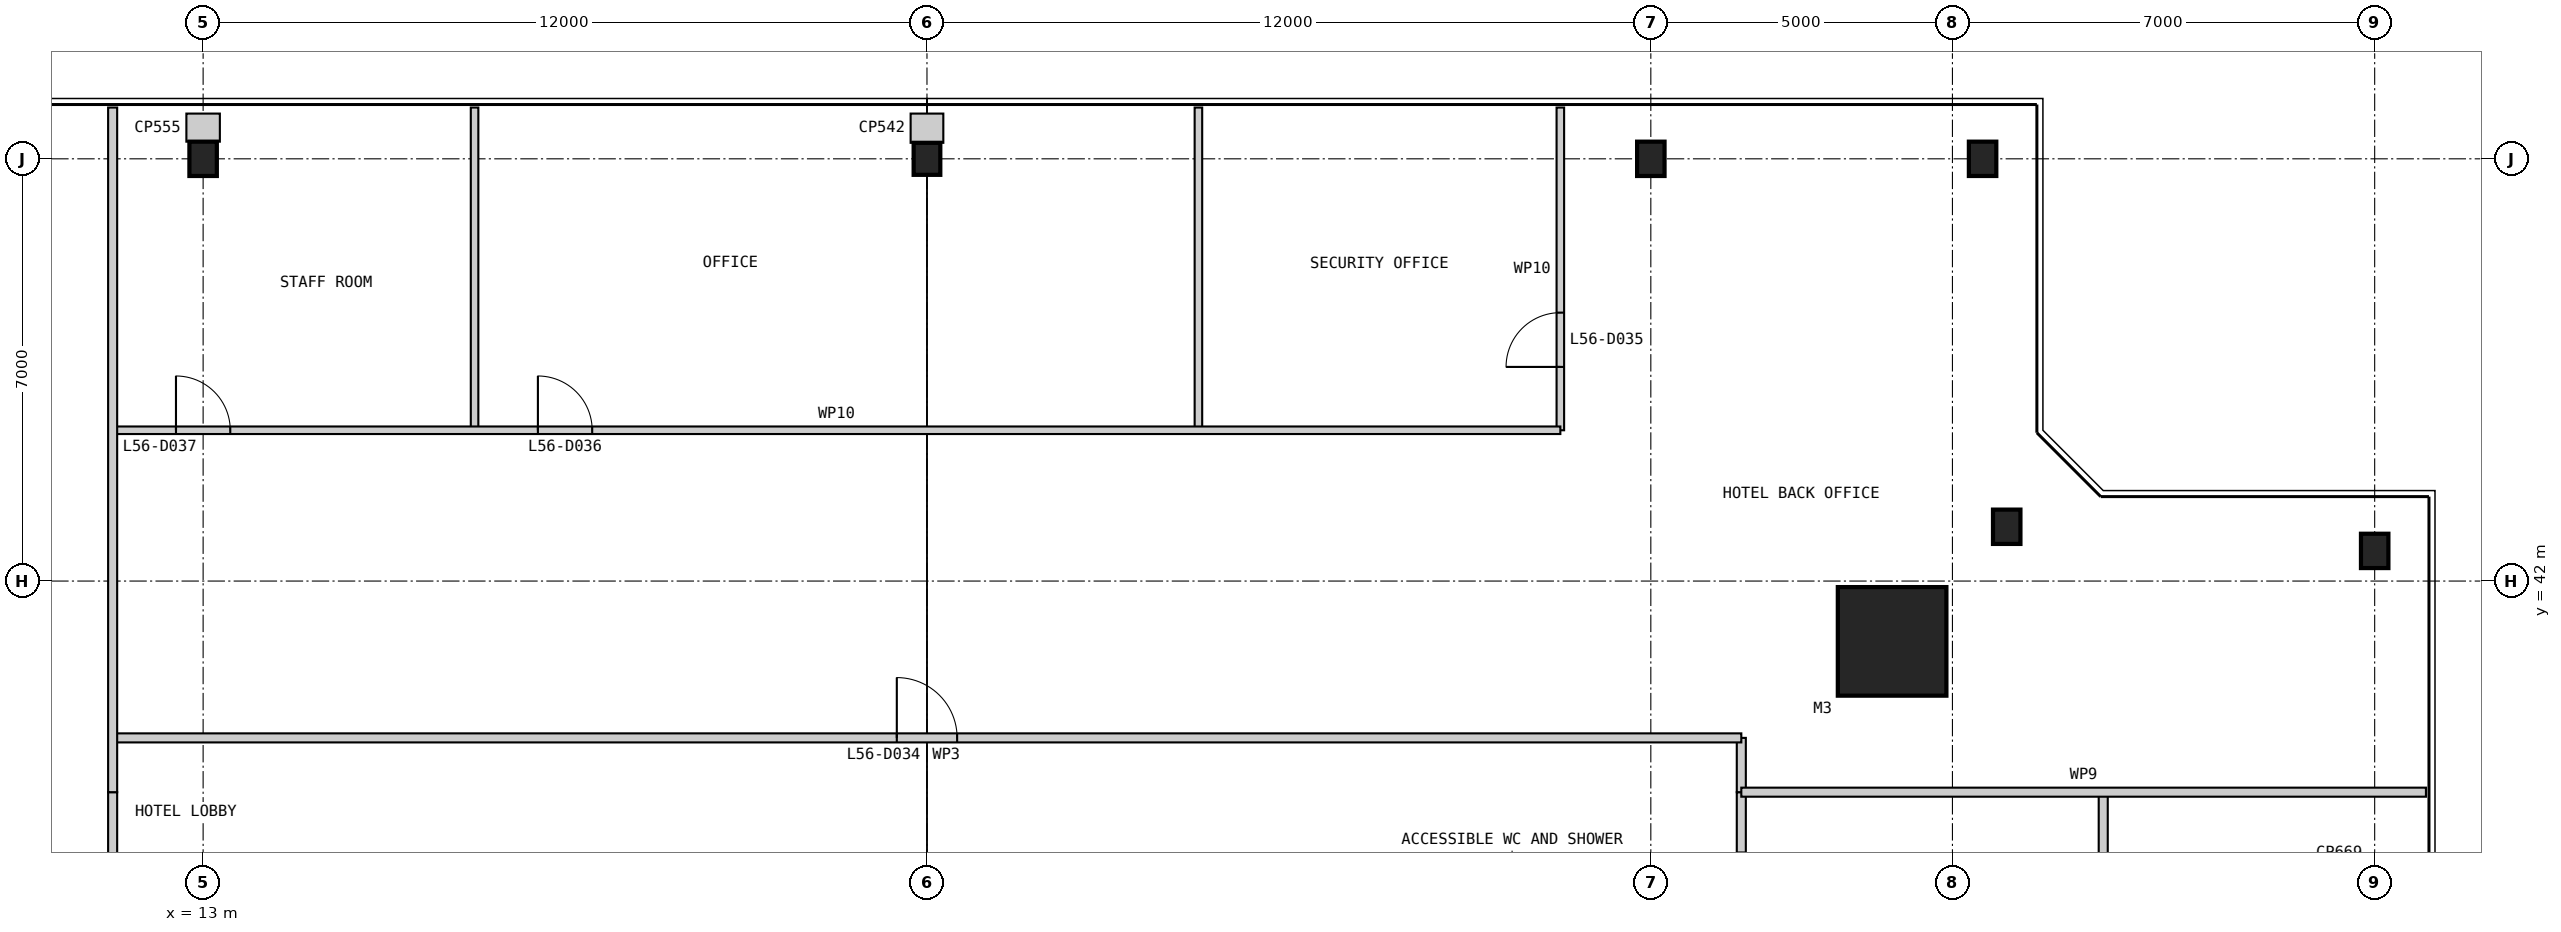
"""IFC4 building model, lengths in metres.
Left out: names, types, materials, properties, quantities, classifications, styles, units other than length and angle.
Written with IfcOpenShell. Run it as: python <this file> out.ifc"""

import sys

from ifc_helpers import new_model, si_unit, direction, frame, frame_2d, origin, origin_2d, place, context, subcontext, project, spatial, rectangle, i_section, extrude, element, fill, save


model = new_model("IFC4")
c1 = context("Model", 3, precision=1e-05, world=origin(), true_north=direction((0.0, 1.0)))
c2 = subcontext(c1, "Body", "Model", "MODEL_VIEW")
j1 = project(units=[si_unit("LENGTHUNIT", "METRE"), si_unit("PLANEANGLEUNIT", "RADIAN")], contexts=[c1])
p1 = place(None, origin())
s1 = spatial("IfcSite", under=j1, at=p1, CompositionType="ELEMENT")
p2 = place(p1, origin())
s2 = spatial("IfcBuilding", under=s1, at=p2, CompositionType="ELEMENT")
p3 = place(p2, frame((0.0, 0.0, 239.8)))
s3 = spatial("IfcBuildingStorey", under=s2, at=p3, CompositionType="ELEMENT", Elevation=239.8)
p4 = place(p3, frame((41.0, 41.0, 0.0), z_axis=(0.0, 0.0, 1.0), x_axis=(1.0, 0.0, 0.0)))
e1 = element("IfcColumn", 1, at=p4, inside=s3, PredefinedType="COLUMN", context=c2, shape_type="SweptSolid", body=[
    extrude(rectangle(XDim=1.8, YDim=1.8, at=origin_2d()), origin(), (0.0, 0.0, 1.0), 6.0),
])
for number, where, z_axis, x_axis in (
    (2, (49.0, 42.5, 0.0), (0.0, 0.0, 1.0), (1.0, 0.0, 0.0)),
    (3, (42.9, 42.9, 0.0), (0.0, 0.0, 1.0), (1.0, 0.0, 0.0)),
    (4, (42.5, 49.0, 0.0), (0.0, 0.0, 1.0), (1.0, 0.0, 0.0)),
    (5, (37.0, 49.0, 0.0), (0.0, 0.0, 1.0), (1.0, 0.0, 0.0)),
):
    element("IfcColumn", number, at=place(p3, frame(where, z_axis=z_axis, x_axis=x_axis)), inside=s3, PredefinedType="COLUMN", context=c2, shape_type="SweptSolid", body=[
        extrude(i_section(OverallWidth=0.455, OverallDepth=0.569, WebThickness=0.078, FlangeThickness=0.125, at=origin_2d()), origin(), (0.0, 0.0, 1.0), 6.0),
    ])
p5 = place(p3, frame((25.0, 49.0, 0.0), z_axis=(0.0, 0.0, 1.0), x_axis=(1.0, 0.0, 0.0)))
e6 = element("IfcColumn", 6, at=p5, inside=s3, PredefinedType="COLUMN", context=c2, shape_type="SweptSolid", body=[
    extrude(i_section(OverallWidth=0.442, OverallDepth=0.531, WebThickness=0.066, FlangeThickness=0.106, at=origin_2d()), origin(), (0.0, 0.0, 1.0), 6.0),
])
p6 = place(p3, frame((13.0, 49.0, 0.0), z_axis=(0.0, 0.0, 1.0), x_axis=(1.0, 0.0, 0.0)))
e7 = element("IfcColumn", 7, at=p6, inside=s3, PredefinedType="COLUMN", context=c2, shape_type="SweptSolid", body=[
    extrude(i_section(OverallWidth=0.455, OverallDepth=0.569, WebThickness=0.078, FlangeThickness=0.125, at=origin_2d()), origin(), (0.0, 0.0, 1.0), 6.0),
])
p7 = place(p3, frame((38.5, 11.5, 0.0), z_axis=(0.0, 0.0, 1.0), x_axis=(0.0, 1.0, 0.0)))
e8 = element("IfcWall", 8, at=p7, inside=s3, PredefinedType="PARTITIONING", context=c2, shape_type="SweptSolid", body=[
    extrude(rectangle(XDim=27.0, YDim=0.15, at=frame_2d((13.5, 0.0))), origin(), (0.0, 0.0, 1.0), 5.85),
])
p8 = place(p7, frame((7.0, 0.0, 0.0)))
e9 = element("IfcOpeningElement", 9, at=p8, cuts=e8, PredefinedType="OPENING", context=c2, shape_type="SweptSolid", body=[
    extrude(rectangle(XDim=1.0, YDim=2.2, at=frame_2d((0.5, 1.1))), frame((0.0, 0.085, 0.0), z_axis=(0.0, -1.0, 0.0), x_axis=(1.0, 0.0, 0.0)), (0.0, 0.0, 1.0), 0.17),
])
p9 = place(p7, frame((16.0, 0.0, 0.0)))
e10 = element("IfcOpeningElement", 10, at=p9, cuts=e8, PredefinedType="OPENING", context=c2, shape_type="SweptSolid", body=[
    extrude(rectangle(XDim=1.0, YDim=2.2, at=frame_2d((0.5, 1.1))), frame((0.0, 0.085, 0.0), z_axis=(0.0, -1.0, 0.0), x_axis=(1.0, 0.0, 0.0)), (0.0, 0.0, 1.0), 0.17),
])
p10 = place(p7, frame((19.0, 0.0, 0.0)))
e11 = element("IfcOpeningElement", 11, at=p10, cuts=e8, PredefinedType="OPENING", context=c2, shape_type="SweptSolid", body=[
    extrude(rectangle(XDim=1.0, YDim=2.2, at=frame_2d((0.5, 1.1))), frame((0.0, 0.085, 0.0), z_axis=(0.0, -1.0, 0.0), x_axis=(1.0, 0.0, 0.0)), (0.0, 0.0, 1.0), 0.17),
])
p11 = place(p7, frame((22.0, 0.0, 0.0)))
e12 = element("IfcOpeningElement", 12, at=p11, cuts=e8, PredefinedType="OPENING", context=c2, shape_type="SweptSolid", body=[
    extrude(rectangle(XDim=1.0, YDim=2.2, at=frame_2d((0.5, 1.1))), frame((0.0, 0.085, 0.0), z_axis=(0.0, -1.0, 0.0), x_axis=(1.0, 0.0, 0.0)), (0.0, 0.0, 1.0), 0.17),
])
p12 = place(p7, frame((25.0, 0.0, 0.0)))
e13 = element("IfcOpeningElement", 13, at=p12, cuts=e8, PredefinedType="OPENING", context=c2, shape_type="SweptSolid", body=[
    extrude(rectangle(XDim=1.0, YDim=2.2, at=frame_2d((0.5, 1.1))), frame((0.0, 0.085, 0.0), z_axis=(0.0, -1.0, 0.0), x_axis=(1.0, 0.0, 0.0)), (0.0, 0.0, 1.0), 0.17),
])
p13 = place(p3, frame((44.5, 35.5, 0.0), z_axis=(0.0, 0.0, 1.0), x_axis=(0.0, 1.0, 0.0)))
e14 = element("IfcWall", 14, at=p13, inside=s3, PredefinedType="PARTITIONING", context=c2, shape_type="SweptSolid", body=[
    extrude(rectangle(XDim=3.0, YDim=0.15, at=frame_2d((1.5, 0.0))), origin(), (0.0, 0.0, 1.0), 5.85),
])
p14 = place(p3, frame((38.5, 38.5, 0.0), z_axis=(0.0, 0.0, 1.0), x_axis=(0.0, 1.0, 0.0)))
e15 = element("IfcWall", 15, at=p14, inside=s3, PredefinedType="PARTITIONING", context=c2, shape_type="SweptSolid", body=[
    extrude(rectangle(XDim=0.9, YDim=0.15, at=frame_2d((0.45, 0.0))), origin(), (0.0, 0.0, 1.0), 5.85),
])
p15 = place(p3, frame((38.5, 39.4, 0.0), z_axis=(0.0, 0.0, 1.0), x_axis=(-1.0, 0.0, 0.0)))
e16 = element("IfcWall", 16, at=p15, inside=s3, PredefinedType="PARTITIONING", context=c2, shape_type="SweptSolid", body=[
    extrude(rectangle(XDim=27.0, YDim=0.15, at=frame_2d((13.5, 0.0))), origin(), (0.0, 0.0, 1.0), 5.85),
])
p16 = place(p15, frame((13.0, 0.0, 0.0)))
e17 = element("IfcOpeningElement", 17, at=p16, cuts=e16, PredefinedType="OPENING", context=c2, shape_type="SweptSolid", body=[
    extrude(rectangle(XDim=1.0, YDim=2.2, at=frame_2d((0.5, 1.1))), frame((0.0, 0.085, 0.0), z_axis=(0.0, -1.0, 0.0), x_axis=(1.0, 0.0, 0.0)), (0.0, 0.0, 1.0), 0.17),
])
p17 = place(p3, frame((49.85, 38.5, 0.0), z_axis=(0.0, 0.0, 1.0), x_axis=(-1.0, 0.0, 0.0)))
e18 = element("IfcWall", 18, at=p17, inside=s3, PredefinedType="PARTITIONING", context=c2, shape_type="SweptSolid", body=[
    extrude(rectangle(XDim=11.35, YDim=0.15, at=frame_2d((5.675, 0.0))), origin(), (0.0, 0.0, 1.0), 5.85),
])
p18 = place(p3, frame((35.5, 49.85, 0.0), z_axis=(0.0, 0.0, 1.0), x_axis=(0.0, -1.0, 0.0)))
e19 = element("IfcWall", 19, at=p18, inside=s3, PredefinedType="PARTITIONING", context=c2, shape_type="SweptSolid", body=[
    extrude(rectangle(XDim=5.35, YDim=0.125, at=frame_2d((2.675, 0.0))), origin(), (0.0, 0.0, 1.0), 5.85),
])
p19 = place(p18, frame((3.4, 0.0, 0.0)))
e20 = element("IfcOpeningElement", 20, at=p19, cuts=e19, PredefinedType="OPENING", context=c2, shape_type="SweptSolid", body=[
    extrude(rectangle(XDim=0.9, YDim=2.2, at=frame_2d((0.45, 1.1))), frame((0.0, 0.073, 0.0), z_axis=(0.0, -1.0, 0.0), x_axis=(1.0, 0.0, 0.0)), (0.0, 0.0, 1.0), 0.145),
])
for number, where, z_axis, x_axis in (
    (21, (29.5, 49.85, 0.0), (0.0, 0.0, 1.0), (0.0, -1.0, 0.0)),
    (22, (17.5, 49.85, 0.0), (0.0, 0.0, 1.0), (0.0, -1.0, 0.0)),
):
    element("IfcWall", number, at=place(p3, frame(where, z_axis=z_axis, x_axis=x_axis)), inside=s3, PredefinedType="PARTITIONING", context=c2, shape_type="SweptSolid", body=[
        extrude(rectangle(XDim=5.35, YDim=0.125, at=frame_2d((2.675, 0.0))), origin(), (0.0, 0.0, 1.0), 5.85),
    ])
p20 = place(p3, frame((35.5, 44.5, 0.0), z_axis=(0.0, 0.0, 1.0), x_axis=(-1.0, 0.0, 0.0)))
e23 = element("IfcWall", 23, at=p20, inside=s3, PredefinedType="PARTITIONING", context=c2, shape_type="SweptSolid", body=[
    extrude(rectangle(XDim=24.0, YDim=0.125, at=frame_2d((12.0, 0.0))), origin(), (0.0, 0.0, 1.0), 5.85),
])
p21 = place(p20, frame((16.05, 0.0, 0.0)))
e24 = element("IfcOpeningElement", 24, at=p21, cuts=e23, PredefinedType="OPENING", context=c2, shape_type="SweptSolid", body=[
    extrude(rectangle(XDim=0.9, YDim=2.2, at=frame_2d((0.45, 1.1))), frame((0.0, 0.073, 0.0), z_axis=(0.0, -1.0, 0.0), x_axis=(1.0, 0.0, 0.0)), (0.0, 0.0, 1.0), 0.145),
])
p22 = place(p20, frame((22.05, 0.0, 0.0)))
e25 = element("IfcOpeningElement", 25, at=p22, cuts=e23, PredefinedType="OPENING", context=c2, shape_type="SweptSolid", body=[
    extrude(rectangle(XDim=0.9, YDim=2.2, at=frame_2d((0.45, 1.1))), frame((0.0, 0.073, 0.0), z_axis=(0.0, -1.0, 0.0), x_axis=(1.0, 0.0, 0.0)), (0.0, 0.0, 1.0), 0.145),
])
p23 = place(p3, frame((11.5, 38.5, 0.0), z_axis=(0.0, 0.0, 1.0), x_axis=(0.0, -1.0, 0.0)))
e26 = element("IfcWall", 26, at=p23, inside=s3, PredefinedType="PARTITIONING", context=c2, shape_type="SweptSolid", body=[
    extrude(rectangle(XDim=27.0, YDim=0.15, at=frame_2d((13.5, 0.0))), origin(), (0.0, 0.0, 1.0), 5.85),
])
p24 = place(p23, frame((7.0, 0.0, 0.0)))
e27 = element("IfcOpeningElement", 27, at=p24, cuts=e26, PredefinedType="OPENING", context=c2, shape_type="SweptSolid", body=[
    extrude(rectangle(XDim=1.0, YDim=2.2, at=frame_2d((0.5, 1.1))), frame((0.0, 0.085, 0.0), z_axis=(0.0, -1.0, 0.0), x_axis=(1.0, 0.0, 0.0)), (0.0, 0.0, 1.0), 0.17),
])
p25 = place(p23, frame((16.0, 0.0, 0.0)))
e28 = element("IfcOpeningElement", 28, at=p25, cuts=e26, PredefinedType="OPENING", context=c2, shape_type="SweptSolid", body=[
    extrude(rectangle(XDim=1.0, YDim=2.2, at=frame_2d((0.5, 1.1))), frame((0.0, 0.085, 0.0), z_axis=(0.0, -1.0, 0.0), x_axis=(1.0, 0.0, 0.0)), (0.0, 0.0, 1.0), 0.17),
])
p26 = place(p23, frame((19.0, 0.0, 0.0)))
e29 = element("IfcOpeningElement", 29, at=p26, cuts=e26, PredefinedType="OPENING", context=c2, shape_type="SweptSolid", body=[
    extrude(rectangle(XDim=1.0, YDim=2.2, at=frame_2d((0.5, 1.1))), frame((0.0, 0.085, 0.0), z_axis=(0.0, -1.0, 0.0), x_axis=(1.0, 0.0, 0.0)), (0.0, 0.0, 1.0), 0.17),
])
p27 = place(p23, frame((22.0, 0.0, 0.0)))
e30 = element("IfcOpeningElement", 30, at=p27, cuts=e26, PredefinedType="OPENING", context=c2, shape_type="SweptSolid", body=[
    extrude(rectangle(XDim=1.0, YDim=2.2, at=frame_2d((0.5, 1.1))), frame((0.0, 0.085, 0.0), z_axis=(0.0, -1.0, 0.0), x_axis=(1.0, 0.0, 0.0)), (0.0, 0.0, 1.0), 0.17),
])
p28 = place(p23, frame((25.0, 0.0, 0.0)))
e31 = element("IfcOpeningElement", 31, at=p28, cuts=e26, PredefinedType="OPENING", context=c2, shape_type="SweptSolid", body=[
    extrude(rectangle(XDim=1.0, YDim=2.2, at=frame_2d((0.5, 1.1))), frame((0.0, 0.085, 0.0), z_axis=(0.0, -1.0, 0.0), x_axis=(1.0, 0.0, 0.0)), (0.0, 0.0, 1.0), 0.17),
])
p29 = place(p3, frame((11.5, 49.85, 0.0), z_axis=(0.0, 0.0, 1.0), x_axis=(0.0, -1.0, 0.0)))
e32 = element("IfcWall", 32, at=p29, inside=s3, PredefinedType="PARTITIONING", context=c2, shape_type="SweptSolid", body=[
    extrude(rectangle(XDim=11.35, YDim=0.15, at=frame_2d((5.675, 0.0))), origin(), (0.0, 0.0, 1.0), 5.85),
])
p30 = place(p3, frame((25.0, 49.75, 0.0), z_axis=(0.0, 0.0, 1.0), x_axis=(0.0, -1.0, 0.0)))
e33 = element("IfcWall", 33, at=p30, inside=s3, PredefinedType="PARTITIONING", context=c2, shape_type="SweptSolid", body=[
    extrude(rectangle(XDim=0.485, YDim=0.542, at=frame_2d((0.242, 0.0))), origin(), (0.0, 0.0, 1.0), 5.85),
])
p31 = place(p3, frame((13.0, 49.75, 0.0), z_axis=(0.0, 0.0, 1.0), x_axis=(0.0, -1.0, 0.0)))
e34 = element("IfcWall", 34, at=p31, inside=s3, PredefinedType="PARTITIONING", context=c2, shape_type="SweptSolid", body=[
    extrude(rectangle(XDim=0.466, YDim=0.555, at=frame_2d((0.233, 0.0))), origin(), (0.0, 0.0, 1.0), 5.85),
])
p32 = place(p16, frame((1.0, 0.0, 0.0), z_axis=(0.0, 0.0, 1.0), x_axis=(-1.0, 0.0, 0.0)))
e35 = element("IfcDoor", 35, at=p32, inside=s3, OperationType="SINGLE_SWING_LEFT", PredefinedType="DOOR", context=c2, shape_type="SweptSolid", body=[
    extrude(rectangle(XDim=1.0, YDim=2.2, at=frame_2d((0.5, 1.1))), frame((0.0, 0.025, 0.0), z_axis=(0.0, -1.0, 0.0), x_axis=(1.0, 0.0, 0.0)), (0.0, 0.0, 1.0), 0.05),
])
fill(e17, e35)
p33 = place(p19, frame((0.9, 0.0, 0.0), z_axis=(0.0, 0.0, 1.0), x_axis=(-1.0, 0.0, 0.0)))
e36 = element("IfcDoor", 36, at=p33, inside=s3, OperationType="SINGLE_SWING_LEFT", PredefinedType="DOOR", context=c2, shape_type="SweptSolid", body=[
    extrude(rectangle(XDim=0.9, YDim=2.2, at=frame_2d((0.45, 1.1))), frame((0.0, 0.025, 0.0), z_axis=(0.0, -1.0, 0.0), x_axis=(1.0, 0.0, 0.0)), (0.0, 0.0, 1.0), 0.05),
])
fill(e20, e36)
p34 = place(p21, frame((0.9, 0.0, 0.0), z_axis=(0.0, 0.0, 1.0), x_axis=(-1.0, 0.0, 0.0)))
e37 = element("IfcDoor", 37, at=p34, inside=s3, OperationType="SINGLE_SWING_LEFT", PredefinedType="DOOR", context=c2, shape_type="SweptSolid", body=[
    extrude(rectangle(XDim=0.9, YDim=2.2, at=frame_2d((0.45, 1.1))), frame((0.0, 0.025, 0.0), z_axis=(0.0, -1.0, 0.0), x_axis=(1.0, 0.0, 0.0)), (0.0, 0.0, 1.0), 0.05),
])
fill(e24, e37)
p35 = place(p22, frame((0.9, 0.0, 0.0), z_axis=(0.0, 0.0, 1.0), x_axis=(-1.0, 0.0, 0.0)))
e38 = element("IfcDoor", 38, at=p35, inside=s3, OperationType="SINGLE_SWING_LEFT", PredefinedType="DOOR", context=c2, shape_type="SweptSolid", body=[
    extrude(rectangle(XDim=0.9, YDim=2.2, at=frame_2d((0.45, 1.1))), frame((0.0, 0.025, 0.0), z_axis=(0.0, -1.0, 0.0), x_axis=(1.0, 0.0, 0.0)), (0.0, 0.0, 1.0), 0.05),
])
fill(e25, e38)
save(model, sys.argv[1])
